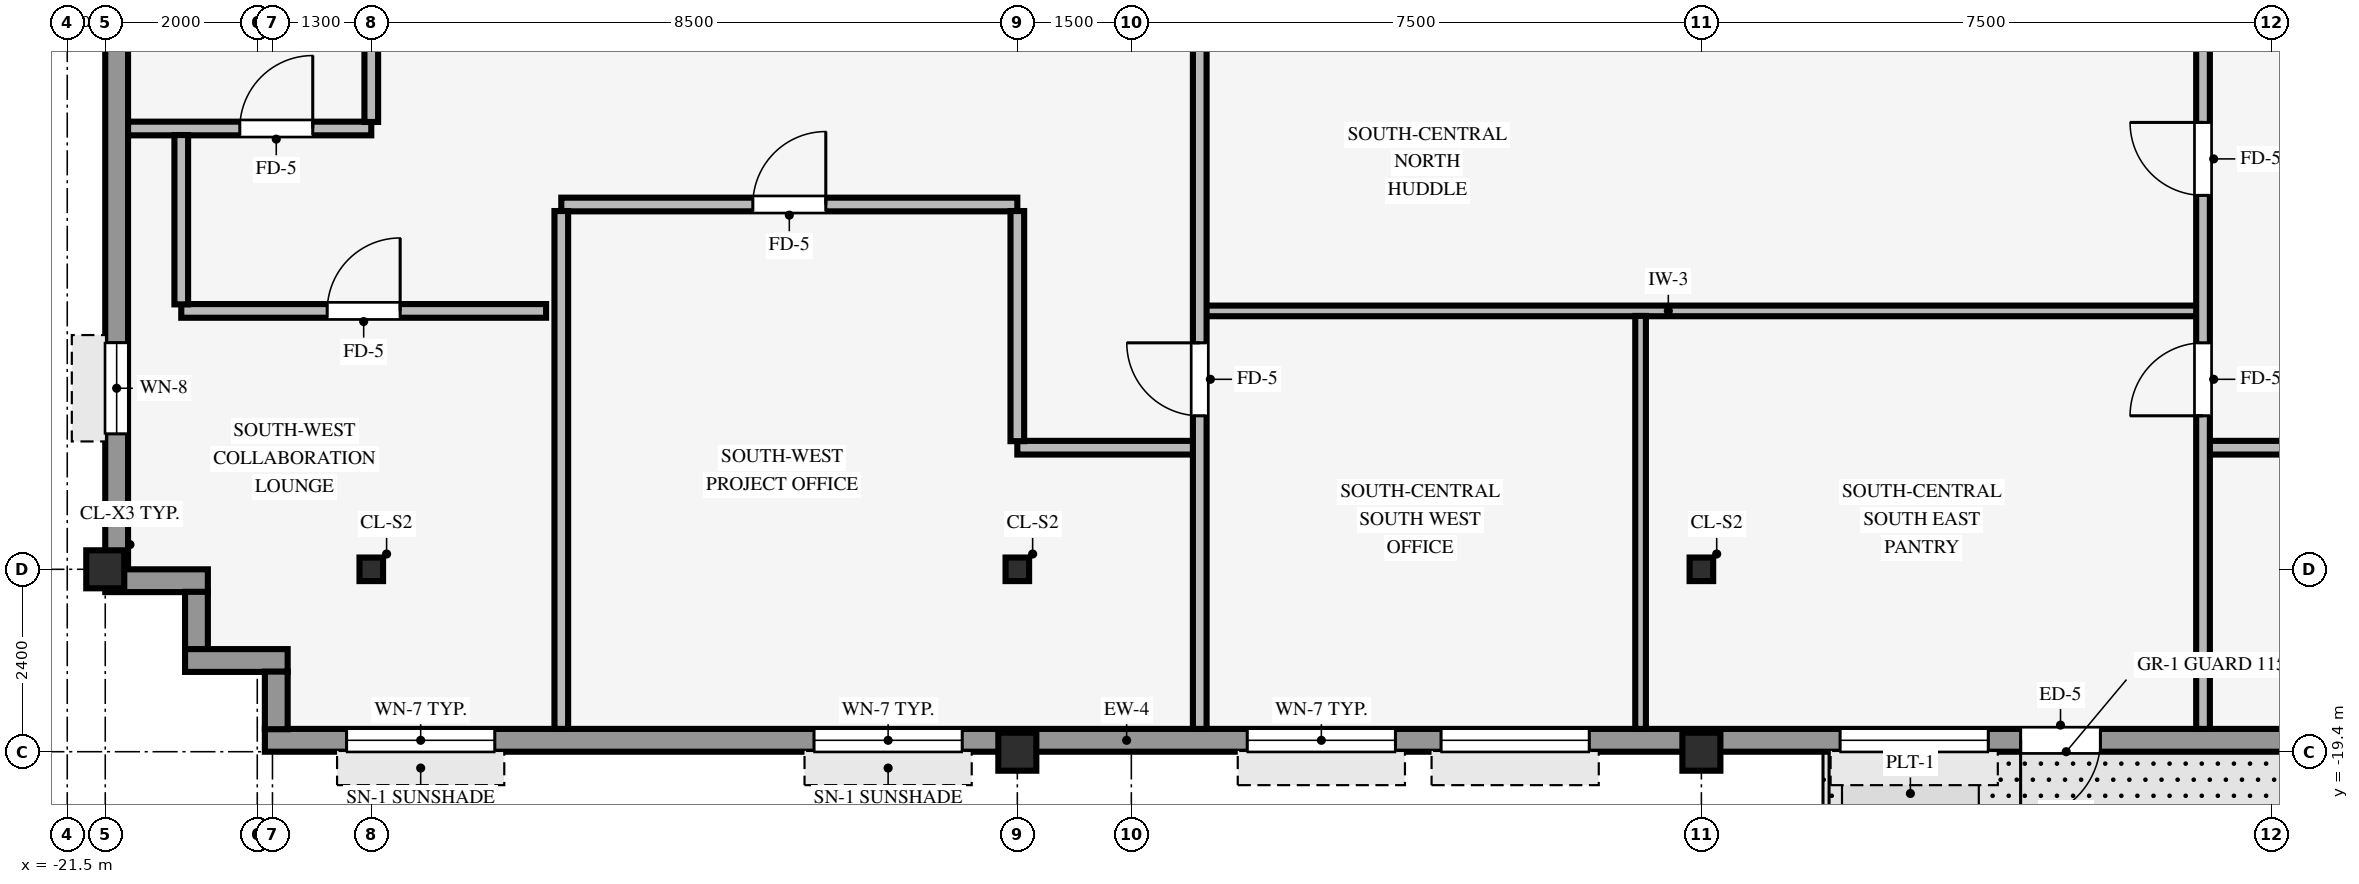
"""IFC4 building model, lengths in metres.
Left out: names, types, materials, properties, quantities, classifications, styles, units other than length and angle.
Written with IfcOpenShell. Run it as: python <this file> out.ifc"""

import sys

from ifc_helpers import new_model, si_unit, direction, frame, frame_2d, origin, origin_2d, place, context, subcontext, project, spatial, rectangle, hollow_rectangle, i_section, extrude, source, transform, mapped, element, fill, save


model = new_model("IFC4")
c1 = context("Model", 3, precision=1e-05, world=origin(), true_north=direction((0.0, 1.0)))
c2 = subcontext(c1, "Body", "Model", "MODEL_VIEW")
j1 = project(units=[si_unit("LENGTHUNIT", "METRE"), si_unit("PLANEANGLEUNIT", "RADIAN")], contexts=[c1])
p1 = place(None, origin())
s1 = spatial("IfcSite", under=j1, at=p1, CompositionType="ELEMENT")
p2 = place(p1, origin())
s2 = spatial("IfcBuilding", under=s1, at=p2, CompositionType="ELEMENT")
p3 = place(p2, frame((0.0, 0.0, 279.85)))
s3 = spatial("IfcBuildingStorey", under=s2, at=p3, CompositionType="ELEMENT", Elevation=279.85)
for number, where, z_axis, x_axis in (
    (1, (-21.0, -17.0, 0.0), (0.0, 0.0, 1.0), (1.0, 0.0, 0.0)),
    (2, (-9.0, -19.4, 0.0), (0.0, 0.0, 1.0), (1.0, 0.0, 0.0)),
    (3, (0.0, -19.4, 0.0), (0.0, 0.0, 1.0), (1.0, 0.0, 0.0)),
):
    element("IfcColumn", number, at=place(p3, frame(where, z_axis=z_axis, x_axis=x_axis)), inside=s3, PredefinedType="COLUMN", context=c2, shape_type="SweptSolid", body=[
        extrude(hollow_rectangle(XDim=0.5, YDim=0.5, WallThickness=0.032, InnerFilletRadius=0.032, OuterFilletRadius=0.064, at=origin_2d()), origin(), (0.0, 0.0, 1.0), 3.37),
    ])
for number, where, z_axis, x_axis in (
    (4, (0.0, -17.0, 0.0), (0.0, 0.0, 1.0), (1.0, 0.0, 0.0)),
    (5, (-17.5, -17.0, 0.0), (0.0, 0.0, 1.0), (1.0, 0.0, 0.0)),
    (6, (-9.0, -17.0, 0.0), (0.0, 0.0, 1.0), (1.0, 0.0, 0.0)),
):
    element("IfcColumn", number, at=place(p3, frame(where, z_axis=z_axis, x_axis=x_axis)), inside=s3, PredefinedType="COLUMN", context=c2, shape_type="SweptSolid", body=[
        extrude(i_section(OverallWidth=0.31, OverallDepth=0.31, WebThickness=0.015, FlangeThickness=0.015, FilletRadius=0.015, at=origin_2d()), origin(), (0.0, 0.0, 1.0), 3.37),
    ])
p4 = place(p3, frame((-18.9, -19.25, 0.0), z_axis=(0.0, 0.0, 1.0), x_axis=(1.0, 0.0, 0.0)))
e7 = element("IfcWall", 7, at=p4, inside=s3, PredefinedType="STANDARD", context=c2, shape_type="SweptSolid", body=[
    extrude(rectangle(XDim=35.6, YDim=0.3, at=frame_2d((17.8, 0.0))), origin(), (0.0, 0.0, 1.0), 2.705),
])
p5 = place(p4, frame((24.15, 0.0, 0.0), z_axis=(0.0, 0.0, 1.0), x_axis=(-1.0, 0.0, 0.0)))
e8 = element("IfcOpeningElement", 8, at=p5, cuts=e7, PredefinedType="OPENING", context=c2, shape_type="SweptSolid", body=[
    extrude(rectangle(XDim=1.05, YDim=2.1, at=frame_2d((0.525, 1.05))), frame((0.0, 0.16, 0.0), z_axis=(0.0, -1.0, 0.0), x_axis=(1.0, 0.0, 0.0)), (0.0, 0.0, 1.0), 0.32),
])
p6 = place(p4, frame((1.075, 0.0, 0.8)))
e9 = element("IfcOpeningElement", 9, at=p6, cuts=e7, PredefinedType="OPENING", context=c2, shape_type="SweptSolid", body=[
    extrude(rectangle(XDim=1.95, YDim=1.48, at=frame_2d((0.975, 0.74))), frame((0.0, 0.16, 0.0), z_axis=(0.0, -1.0, 0.0), x_axis=(1.0, 0.0, 0.0)), (0.0, 0.0, 1.0), 0.32),
])
p7 = place(p4, frame((7.225, 0.0, 0.8)))
e10 = element("IfcOpeningElement", 10, at=p7, cuts=e7, PredefinedType="OPENING", context=c2, shape_type="SweptSolid", body=[
    extrude(rectangle(XDim=1.95, YDim=1.48, at=frame_2d((0.975, 0.74))), frame((0.0, 0.16, 0.0), z_axis=(0.0, -1.0, 0.0), x_axis=(1.0, 0.0, 0.0)), (0.0, 0.0, 1.0), 0.32),
])
p8 = place(p4, frame((12.925, 0.0, 0.8)))
e11 = element("IfcOpeningElement", 11, at=p8, cuts=e7, PredefinedType="OPENING", context=c2, shape_type="SweptSolid", body=[
    extrude(rectangle(XDim=1.95, YDim=1.48, at=frame_2d((0.975, 0.74))), frame((0.0, 0.16, 0.0), z_axis=(0.0, -1.0, 0.0), x_axis=(1.0, 0.0, 0.0)), (0.0, 0.0, 1.0), 0.32),
])
p9 = place(p4, frame((15.475, 0.0, 0.8)))
e12 = element("IfcOpeningElement", 12, at=p9, cuts=e7, PredefinedType="OPENING", context=c2, shape_type="SweptSolid", body=[
    extrude(rectangle(XDim=1.95, YDim=1.48, at=frame_2d((0.975, 0.74))), frame((0.0, 0.16, 0.0), z_axis=(0.0, -1.0, 0.0), x_axis=(1.0, 0.0, 0.0)), (0.0, 0.0, 1.0), 0.32),
])
p10 = place(p4, frame((20.725, 0.0, 0.8)))
e13 = element("IfcOpeningElement", 13, at=p10, cuts=e7, PredefinedType="OPENING", context=c2, shape_type="SweptSolid", body=[
    extrude(rectangle(XDim=1.95, YDim=1.48, at=frame_2d((0.975, 0.74))), frame((0.0, 0.16, 0.0), z_axis=(0.0, -1.0, 0.0), x_axis=(1.0, 0.0, 0.0)), (0.0, 0.0, 1.0), 0.32),
])
p11 = place(p4, frame((31.225, 0.0, 0.8)))
e14 = element("IfcOpeningElement", 14, at=p11, cuts=e7, PredefinedType="OPENING", context=c2, shape_type="SweptSolid", body=[
    extrude(rectangle(XDim=1.95, YDim=1.48, at=frame_2d((0.975, 0.74))), frame((0.0, 0.16, 0.0), z_axis=(0.0, -1.0, 0.0), x_axis=(1.0, 0.0, 0.0)), (0.0, 0.0, 1.0), 0.32),
])
p12 = place(p3, frame((-20.85, -17.004, 0.0), z_axis=(0.0, 0.0, 1.0), x_axis=(0.0, 1.0, 0.0)))
e15 = element("IfcWall", 15, at=p12, inside=s3, PredefinedType="STANDARD", context=c2, shape_type="SweptSolid", body=[
    extrude(rectangle(XDim=34.008, YDim=0.3, at=frame_2d((17.004, 0.0))), origin(), (0.0, 0.0, 1.0), 2.705),
])
p13 = place(p12, frame((1.786, 0.0, 0.8)))
e16 = element("IfcOpeningElement", 16, at=p13, cuts=e15, PredefinedType="OPENING", context=c2, shape_type="SweptSolid", body=[
    extrude(rectangle(XDim=1.2, YDim=1.48, at=frame_2d((0.6, 0.74))), frame((0.0, 0.16, 0.0), z_axis=(0.0, -1.0, 0.0), x_axis=(1.0, 0.0, 0.0)), (0.0, 0.0, 1.0), 0.32),
])
p14 = place(p12, frame((8.159, 0.0, 0.8)))
e17 = element("IfcOpeningElement", 17, at=p14, cuts=e15, PredefinedType="OPENING", context=c2, shape_type="SweptSolid", body=[
    extrude(rectangle(XDim=1.2, YDim=1.48, at=frame_2d((0.6, 0.74))), frame((0.0, 0.16, 0.0), z_axis=(0.0, -1.0, 0.0), x_axis=(1.0, 0.0, 0.0)), (0.0, 0.0, 1.0), 0.32),
])
p15 = place(p12, frame((11.831, 0.0, 0.8)))
e18 = element("IfcOpeningElement", 18, at=p15, cuts=e15, PredefinedType="OPENING", context=c2, shape_type="SweptSolid", body=[
    extrude(rectangle(XDim=1.2, YDim=1.48, at=frame_2d((0.6, 0.74))), frame((0.0, 0.16, 0.0), z_axis=(0.0, -1.0, 0.0), x_axis=(1.0, 0.0, 0.0)), (0.0, 0.0, 1.0), 0.32),
])
p16 = place(p12, frame((15.054, 0.0, 0.8)))
e19 = element("IfcOpeningElement", 19, at=p16, cuts=e15, PredefinedType="OPENING", context=c2, shape_type="SweptSolid", body=[
    extrude(rectangle(XDim=1.2, YDim=1.48, at=frame_2d((0.6, 0.74))), frame((0.0, 0.16, 0.0), z_axis=(0.0, -1.0, 0.0), x_axis=(1.0, 0.0, 0.0)), (0.0, 0.0, 1.0), 0.32),
])
p17 = place(p12, frame((20.977, 0.0, 0.8)))
e20 = element("IfcOpeningElement", 20, at=p17, cuts=e15, PredefinedType="OPENING", context=c2, shape_type="SweptSolid", body=[
    extrude(rectangle(XDim=1.2, YDim=1.48, at=frame_2d((0.6, 0.74))), frame((0.0, 0.16, 0.0), z_axis=(0.0, -1.0, 0.0), x_axis=(1.0, 0.0, 0.0)), (0.0, 0.0, 1.0), 0.32),
])
p18 = place(p12, frame((24.649, 0.0, 0.8)))
e21 = element("IfcOpeningElement", 21, at=p18, cuts=e15, PredefinedType="OPENING", context=c2, shape_type="SweptSolid", body=[
    extrude(rectangle(XDim=1.2, YDim=1.48, at=frame_2d((0.6, 0.74))), frame((0.0, 0.16, 0.0), z_axis=(0.0, -1.0, 0.0), x_axis=(1.0, 0.0, 0.0)), (0.0, 0.0, 1.0), 0.32),
])
p19 = place(p12, frame((31.022, 0.0, 0.8)))
e22 = element("IfcOpeningElement", 22, at=p19, cuts=e15, PredefinedType="OPENING", context=c2, shape_type="SweptSolid", body=[
    extrude(rectangle(XDim=1.2, YDim=1.48, at=frame_2d((0.6, 0.74))), frame((0.0, 0.16, 0.0), z_axis=(0.0, -1.0, 0.0), x_axis=(1.0, 0.0, 0.0)), (0.0, 0.0, 1.0), 0.32),
])
p20 = place(p3, frame((-21.0, -17.15, 0.0), z_axis=(0.0, 0.0, 1.0), x_axis=(1.0, 0.0, 0.0)))
e23 = element("IfcWall", 23, at=p20, inside=s3, PredefinedType="STANDARD", context=c2, shape_type="SweptSolid", body=[
    extrude(rectangle(XDim=1.35, YDim=0.3, at=frame_2d((0.675, 0.0))), origin(), (0.0, 0.0, 1.0), 2.892),
])
p21 = place(p3, frame((-19.8, -18.054, 0.0), z_axis=(0.0, 0.0, 1.0), x_axis=(0.0, 1.0, 0.0)))
e24 = element("IfcWall", 24, at=p21, inside=s3, PredefinedType="STANDARD", context=c2, shape_type="SweptSolid", body=[
    extrude(rectangle(XDim=0.758, YDim=0.3, at=frame_2d((0.379, 0.0))), origin(), (0.0, 0.0, 1.0), 2.892),
])
p22 = place(p3, frame((-19.95, -18.2, 0.0), z_axis=(0.0, 0.0, 1.0), x_axis=(1.0, 0.0, 0.0)))
e25 = element("IfcWall", 25, at=p22, inside=s3, PredefinedType="STANDARD", context=c2, shape_type="SweptSolid", body=[
    extrude(rectangle(XDim=1.35, YDim=0.3, at=frame_2d((0.675, 0.0))), origin(), (0.0, 0.0, 1.0), 2.892),
])
p23 = place(p3, frame((-18.75, -19.104, 0.0), z_axis=(0.0, 0.0, 1.0), x_axis=(0.0, 1.0, 0.0)))
e26 = element("IfcWall", 26, at=p23, inside=s3, PredefinedType="STANDARD", context=c2, shape_type="SweptSolid", body=[
    extrude(rectangle(XDim=0.758, YDim=0.3, at=frame_2d((0.379, 0.0))), origin(), (0.0, 0.0, 1.0), 2.892),
])
p24 = place(p3, frame((-9.0, -15.4, 0.0), z_axis=(0.0, 0.0, 1.0), x_axis=(1.0, 0.0, 0.0)))
e27 = element("IfcWall", 27, at=p24, inside=s3, PredefinedType="PARTITIONING", context=c2, shape_type="SweptSolid", body=[
    extrude(rectangle(XDim=2.324, YDim=0.18, at=frame_2d((1.162, 0.0))), origin(), (0.0, 0.0, 1.0), 3.36),
])
p25 = place(p3, frame((6.666, -15.4, 0.0), z_axis=(0.0, 0.0, 1.0), x_axis=(1.0, 0.0, 0.0)))
e28 = element("IfcWall", 28, at=p25, inside=s3, PredefinedType="PARTITIONING", context=c2, shape_type="SweptSolid", body=[
    extrude(rectangle(XDim=2.334, YDim=0.18, at=frame_2d((1.167, 0.0))), origin(), (0.0, 0.0, 1.0), 3.36),
])
p26 = place(p3, frame((-20.0, -13.6, 0.0), z_axis=(0.0, 0.0, 1.0), x_axis=(1.0, 0.0, 0.0)))
e29 = element("IfcWall", 29, at=p26, inside=s3, PredefinedType="PARTITIONING", context=c2, shape_type="SweptSolid", body=[
    extrude(rectangle(XDim=4.8, YDim=0.18, at=frame_2d((2.4, 0.0))), origin(), (0.0, 0.0, 1.0), 3.038),
])
p27 = place(p26, frame((1.92, 0.0, 0.0)))
e30 = element("IfcOpeningElement", 30, at=p27, cuts=e29, PredefinedType="OPENING", context=c2, shape_type="SweptSolid", body=[
    extrude(rectangle(XDim=0.96, YDim=2.1, at=frame_2d((0.48, 1.05))), frame((0.0, 0.1, 0.0), z_axis=(0.0, -1.0, 0.0), x_axis=(1.0, 0.0, 0.0)), (0.0, 0.0, 1.0), 0.2),
])
p28 = place(p3, frame((-6.524, -13.6, 0.0), z_axis=(0.0, 0.0, 1.0), x_axis=(1.0, 0.0, 0.0)))
e31 = element("IfcWall", 31, at=p28, inside=s3, PredefinedType="PARTITIONING", context=c2, shape_type="SweptSolid", body=[
    extrude(rectangle(XDim=13.058, YDim=0.14, at=frame_2d((6.529, 0.0))), origin(), (0.0, 0.0, 1.0), 3.038),
])
p29 = place(p3, frame((-15.0, -12.2, 0.0), z_axis=(0.0, 0.0, 1.0), x_axis=(1.0, 0.0, 0.0)))
e32 = element("IfcWall", 32, at=p29, inside=s3, PredefinedType="PARTITIONING", context=c2, shape_type="SweptSolid", body=[
    extrude(rectangle(XDim=6.0, YDim=0.18, at=frame_2d((3.0, 0.0))), origin(), (0.0, 0.0, 1.0), 3.36),
])
p30 = place(p29, frame((2.52, 0.0, 0.0)))
e33 = element("IfcOpeningElement", 33, at=p30, cuts=e32, PredefinedType="OPENING", context=c2, shape_type="SweptSolid", body=[
    extrude(rectangle(XDim=0.96, YDim=2.1, at=frame_2d((0.48, 1.05))), frame((0.0, 0.1, 0.0), z_axis=(0.0, -1.0, 0.0), x_axis=(1.0, 0.0, 0.0)), (0.0, 0.0, 1.0), 0.2),
])
p31 = place(p3, frame((-20.7, -11.2, 0.0), z_axis=(0.0, 0.0, 1.0), x_axis=(1.0, 0.0, 0.0)))
e34 = element("IfcWall", 34, at=p31, inside=s3, PredefinedType="PARTITIONING", context=c2, shape_type="SweptSolid", body=[
    extrude(rectangle(XDim=3.2, YDim=0.18, at=frame_2d((1.6, 0.0))), origin(), (0.0, 0.0, 1.0), 3.36),
])
p32 = place(p31, frame((1.47, 0.0, 0.0)))
e35 = element("IfcOpeningElement", 35, at=p32, cuts=e34, PredefinedType="OPENING", context=c2, shape_type="SweptSolid", body=[
    extrude(rectangle(XDim=0.96, YDim=2.1, at=frame_2d((0.48, 1.05))), frame((0.0, 0.1, 0.0), z_axis=(0.0, -1.0, 0.0), x_axis=(1.0, 0.0, 0.0)), (0.0, 0.0, 1.0), 0.2),
])
p33 = place(p3, frame((-20.0, -13.514, 0.0), z_axis=(0.0, 0.0, 1.0), x_axis=(0.0, 1.0, 0.0)))
e36 = element("IfcWall", 36, at=p33, inside=s3, PredefinedType="PARTITIONING", context=c2, shape_type="SweptSolid", body=[
    extrude(rectangle(XDim=2.228, YDim=0.18, at=frame_2d((1.114, 0.0))), origin(), (0.0, 0.0, 1.0), 3.36),
])
p34 = place(p3, frame((-17.5, -11.114, 0.0), z_axis=(0.0, 0.0, 1.0), x_axis=(0.0, 1.0, 0.0)))
e37 = element("IfcWall", 37, at=p34, inside=s3, PredefinedType="PARTITIONING", context=c2, shape_type="SweptSolid", body=[
    extrude(rectangle(XDim=1.118, YDim=0.18, at=frame_2d((0.559, 0.0))), origin(), (0.0, 0.0, 1.0), 2.892),
])
p35 = place(p3, frame((-15.0, -19.1, 0.0), z_axis=(0.0, 0.0, 1.0), x_axis=(0.0, 1.0, 0.0)))
e38 = element("IfcWall", 38, at=p35, inside=s3, PredefinedType="PARTITIONING", context=c2, shape_type="SweptSolid", body=[
    extrude(rectangle(XDim=6.814, YDim=0.18, at=frame_2d((3.407, 0.0))), origin(), (0.0, 0.0, 1.0), 3.36),
])
p36 = place(p3, frame((-9.0, -15.314, 0.0), z_axis=(0.0, 0.0, 1.0), x_axis=(0.0, 1.0, 0.0)))
e39 = element("IfcWall", 39, at=p36, inside=s3, PredefinedType="PARTITIONING", context=c2, shape_type="SweptSolid", body=[
    extrude(rectangle(XDim=3.028, YDim=0.18, at=frame_2d((1.514, 0.0))), origin(), (0.0, 0.0, 1.0), 2.892),
])
p37 = place(p3, frame((-6.6, -19.1, 0.0), z_axis=(0.0, 0.0, 1.0), x_axis=(0.0, 1.0, 0.0)))
e40 = element("IfcWall", 40, at=p37, inside=s3, PredefinedType="PARTITIONING", context=c2, shape_type="SweptSolid", body=[
    extrude(rectangle(XDim=17.764, YDim=0.18, at=frame_2d((8.882, 0.0))), origin(), (0.0, 0.0, 1.0), 3.36),
])
p38 = place(p37, frame((4.12, 0.0, 0.0)))
e41 = element("IfcOpeningElement", 41, at=p38, cuts=e40, PredefinedType="OPENING", context=c2, shape_type="SweptSolid", body=[
    extrude(rectangle(XDim=0.96, YDim=2.1, at=frame_2d((0.48, 1.05))), frame((0.0, 0.1, 0.0), z_axis=(0.0, -1.0, 0.0), x_axis=(1.0, 0.0, 0.0)), (0.0, 0.0, 1.0), 0.2),
])
p39 = place(p3, frame((-0.8, -19.1, 0.0), z_axis=(0.0, 0.0, 1.0), x_axis=(0.0, 1.0, 0.0)))
e42 = element("IfcWall", 42, at=p39, inside=s3, PredefinedType="PARTITIONING", context=c2, shape_type="SweptSolid", body=[
    extrude(rectangle(XDim=5.434, YDim=0.14, at=frame_2d((2.717, 0.0))), origin(), (0.0, 0.0, 1.0), 3.36),
])
p40 = place(p3, frame((6.6, -19.1, 0.0), z_axis=(0.0, 0.0, 1.0), x_axis=(0.0, 1.0, 0.0)))
e43 = element("IfcWall", 43, at=p40, inside=s3, PredefinedType="PARTITIONING", context=c2, shape_type="SweptSolid", body=[
    extrude(rectangle(XDim=17.764, YDim=0.18, at=frame_2d((8.882, 0.0))), origin(), (0.0, 0.0, 1.0), 3.36),
])
p41 = place(p40, frame((13.152, 0.0, 0.0)))
e44 = element("IfcOpeningElement", 44, at=p41, cuts=e43, PredefinedType="OPENING", context=c2, shape_type="SweptSolid", body=[
    extrude(rectangle(XDim=0.96, YDim=2.1, at=frame_2d((0.48, 1.05))), frame((0.0, 0.1, 0.0), z_axis=(0.0, -1.0, 0.0), x_axis=(1.0, 0.0, 0.0)), (0.0, 0.0, 1.0), 0.2),
])
p42 = place(p40, frame((7.02, 0.0, 0.0)))
e45 = element("IfcOpeningElement", 45, at=p42, cuts=e43, PredefinedType="OPENING", context=c2, shape_type="SweptSolid", body=[
    extrude(rectangle(XDim=0.96, YDim=2.1, at=frame_2d((0.48, 1.05))), frame((0.0, 0.1, 0.0), z_axis=(0.0, -1.0, 0.0), x_axis=(1.0, 0.0, 0.0)), (0.0, 0.0, 1.0), 0.2),
])
p43 = place(p40, frame((4.12, 0.0, 0.0)))
e46 = element("IfcOpeningElement", 46, at=p43, cuts=e43, PredefinedType="OPENING", context=c2, shape_type="SweptSolid", body=[
    extrude(rectangle(XDim=0.96, YDim=2.1, at=frame_2d((0.48, 1.05))), frame((0.0, 0.1, 0.0), z_axis=(0.0, -1.0, 0.0), x_axis=(1.0, 0.0, 0.0)), (0.0, 0.0, 1.0), 0.2),
])
m1 = source(origin(), c2, "Body", "SweptSolid", [
    extrude(rectangle(XDim=1.05, YDim=2.1, at=frame_2d((0.525, 1.05))), frame((0.0, 0.025, 0.0), z_axis=(0.0, -1.0, 0.0), x_axis=(1.0, 0.0, 0.0)), (0.0, 0.0, 1.0), 0.05),
])
p44 = place(p5, origin())
e47 = element("IfcDoor", 47, at=p44, inside=s3, OperationType="SINGLE_SWING_RIGHT", PredefinedType="DOOR", context=c2, shape_type="MappedRepresentation", body=[
    mapped(m1, transform((0.0, 0.0, 0.0), scale=1.0)),
])
fill(e8, e47)
m2 = source(origin(), c2, "Body", "SweptSolid", [
    extrude(rectangle(XDim=1.95, YDim=1.48, at=frame_2d((0.975, 0.74))), frame((0.0, 0.03, 0.0), z_axis=(0.0, -1.0, 0.0), x_axis=(1.0, 0.0, 0.0)), (0.0, 0.0, 1.0), 0.06),
])
p45 = place(p6, origin())
e48 = element("IfcWindow", 48, at=p45, inside=s3, PartitioningType="SINGLE_PANEL", PredefinedType="WINDOW", context=c2, shape_type="MappedRepresentation", body=[
    mapped(m2, transform((0.0, 0.0, 0.0), scale=1.0)),
])
fill(e9, e48)
p46 = place(p7, origin())
e49 = element("IfcWindow", 49, at=p46, inside=s3, PartitioningType="SINGLE_PANEL", PredefinedType="WINDOW", context=c2, shape_type="MappedRepresentation", body=[
    mapped(m2, transform((0.0, 0.0, 0.0), scale=1.0)),
])
fill(e10, e49)
p47 = place(p8, origin())
e50 = element("IfcWindow", 50, at=p47, inside=s3, PartitioningType="SINGLE_PANEL", PredefinedType="WINDOW", context=c2, shape_type="MappedRepresentation", body=[
    mapped(m2, transform((0.0, 0.0, 0.0), scale=1.0)),
])
fill(e11, e50)
p48 = place(p9, origin())
e51 = element("IfcWindow", 51, at=p48, inside=s3, PartitioningType="SINGLE_PANEL", PredefinedType="WINDOW", context=c2, shape_type="MappedRepresentation", body=[
    mapped(m2, transform((0.0, 0.0, 0.0), scale=1.0)),
])
fill(e12, e51)
p49 = place(p10, origin())
e52 = element("IfcWindow", 52, at=p49, inside=s3, PartitioningType="SINGLE_PANEL", PredefinedType="WINDOW", context=c2, shape_type="MappedRepresentation", body=[
    mapped(m2, transform((0.0, 0.0, 0.0), scale=1.0)),
])
fill(e13, e52)
m3 = source(origin(), c2, "Body", "SweptSolid", [
    extrude(rectangle(XDim=1.2, YDim=1.48, at=frame_2d((0.6, 0.74))), frame((0.0, 0.03, 0.0), z_axis=(0.0, -1.0, 0.0), x_axis=(1.0, 0.0, 0.0)), (0.0, 0.0, 1.0), 0.06),
])
p50 = place(p13, origin())
e53 = element("IfcWindow", 53, at=p50, inside=s3, PartitioningType="SINGLE_PANEL", PredefinedType="WINDOW", context=c2, shape_type="MappedRepresentation", body=[
    mapped(m3, transform((0.0, 0.0, 0.0), scale=1.0)),
])
fill(e16, e53)
m4 = source(origin(), c2, "Body", "SweptSolid", [
    extrude(rectangle(XDim=0.96, YDim=2.1, at=frame_2d((0.48, 1.05))), frame((0.0, 0.025, 0.0), z_axis=(0.0, -1.0, 0.0), x_axis=(1.0, 0.0, 0.0)), (0.0, 0.0, 1.0), 0.05),
])
p51 = place(p30, origin())
e54 = element("IfcDoor", 54, at=p51, inside=s3, OperationType="SINGLE_SWING_RIGHT", PredefinedType="DOOR", context=c2, shape_type="MappedRepresentation", body=[
    mapped(m4, transform((0.0, 0.0, 0.0), scale=1.0)),
])
fill(e33, e54)
p52 = place(p27, origin())
e55 = element("IfcDoor", 55, at=p52, inside=s3, OperationType="SINGLE_SWING_RIGHT", PredefinedType="DOOR", context=c2, shape_type="MappedRepresentation", body=[
    mapped(m4, transform((0.0, 0.0, 0.0), scale=1.0)),
])
fill(e30, e55)
p53 = place(p42, origin())
e56 = element("IfcDoor", 56, at=p53, inside=s3, OperationType="SINGLE_SWING_RIGHT", PredefinedType="DOOR", context=c2, shape_type="MappedRepresentation", body=[
    mapped(m4, transform((0.0, 0.0, 0.0), scale=1.0)),
])
fill(e45, e56)
p54 = place(p32, origin())
e57 = element("IfcDoor", 57, at=p54, inside=s3, OperationType="SINGLE_SWING_RIGHT", PredefinedType="DOOR", context=c2, shape_type="MappedRepresentation", body=[
    mapped(m4, transform((0.0, 0.0, 0.0), scale=1.0)),
])
fill(e35, e57)
p55 = place(p38, origin())
e58 = element("IfcDoor", 58, at=p55, inside=s3, OperationType="SINGLE_SWING_RIGHT", PredefinedType="DOOR", context=c2, shape_type="MappedRepresentation", body=[
    mapped(m4, transform((0.0, 0.0, 0.0), scale=1.0)),
])
fill(e41, e58)
p56 = place(p43, origin())
e59 = element("IfcDoor", 59, at=p56, inside=s3, OperationType="SINGLE_SWING_LEFT", PredefinedType="DOOR", context=c2, shape_type="MappedRepresentation", body=[
    mapped(m4, transform((0.0, 0.0, 0.0), scale=1.0)),
])
fill(e46, e59)
save(model, sys.argv[1])
